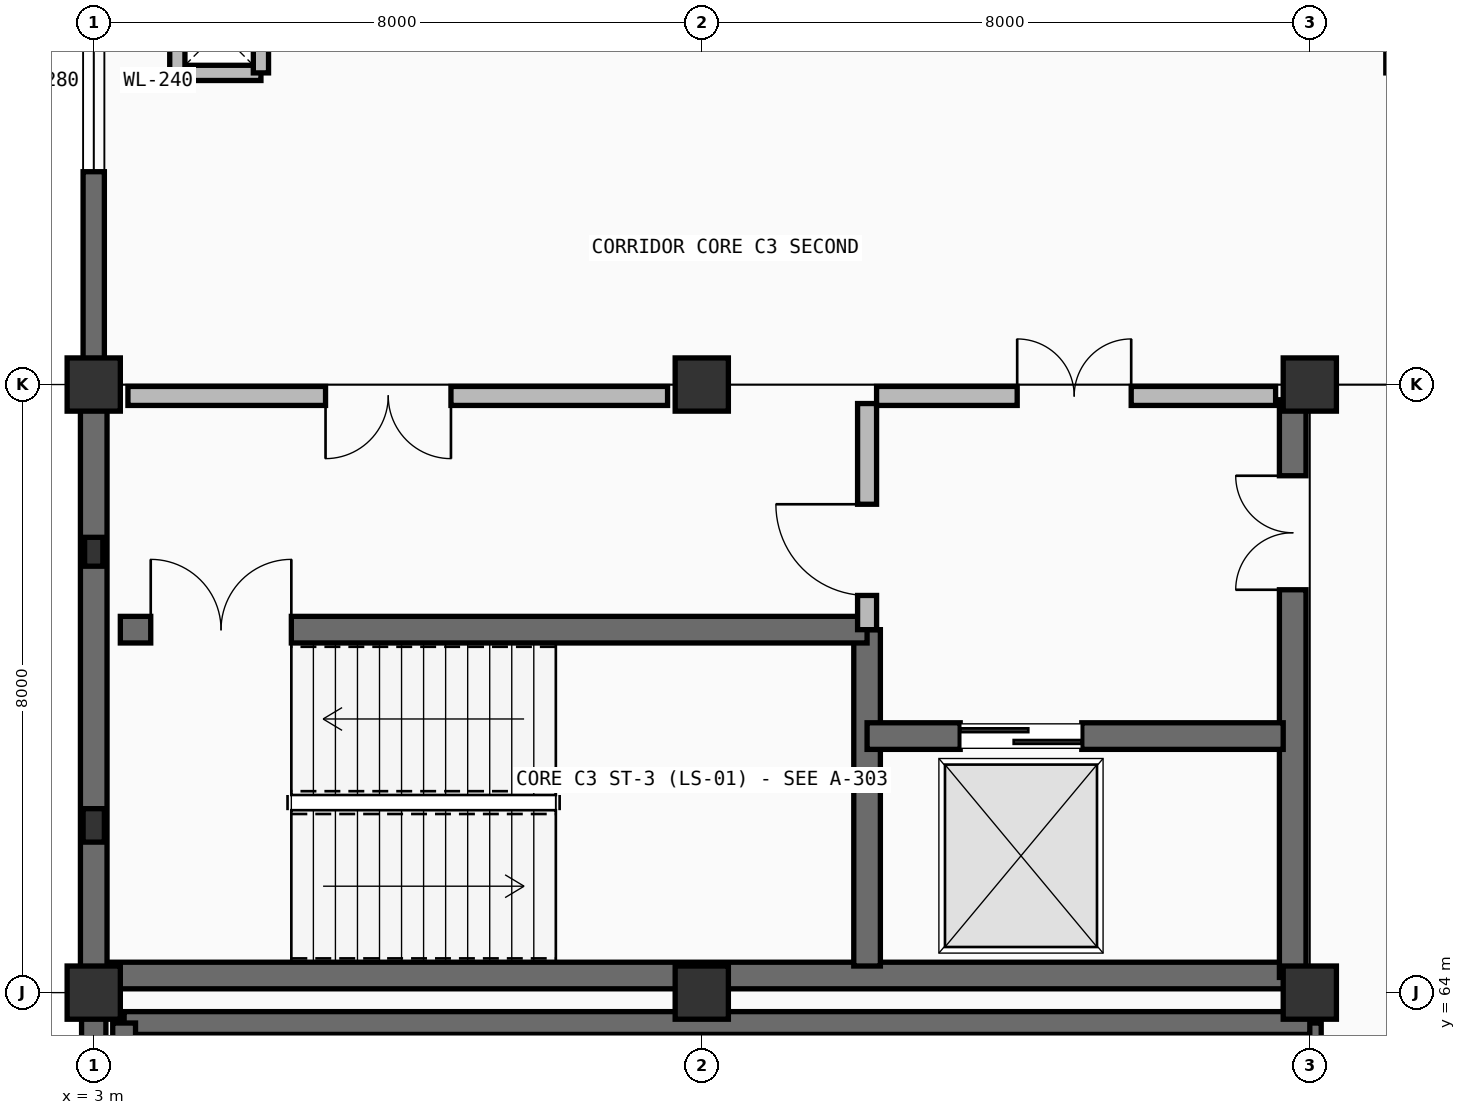
"""IFC4 building model, lengths in metres.
Left out: names, types, materials, properties, quantities, classifications, styles, units other than length and angle.
Written with IfcOpenShell. Run it as: python <this file> out.ifc"""

import sys

from ifc_helpers import new_model, si_unit, direction, frame, frame_2d, origin, origin_2d, place, context, subcontext, project, spatial, rectangle, extrude, element, fill, save


model = new_model("IFC4")
c1 = context("Model", 3, precision=1e-05, world=origin(), true_north=direction((0.0, 1.0)))
c2 = subcontext(c1, "Body", "Model", "MODEL_VIEW")
j1 = project(units=[si_unit("LENGTHUNIT", "METRE"), si_unit("PLANEANGLEUNIT", "RADIAN")], contexts=[c1])
p1 = place(None, origin())
s1 = spatial("IfcSite", under=j1, at=p1, CompositionType="ELEMENT")
p2 = place(p1, origin())
s2 = spatial("IfcBuilding", under=s1, at=p2, CompositionType="ELEMENT")
p3 = place(p2, frame((0.0, 0.0, 9.9)))
s3 = spatial("IfcBuildingStorey", under=s2, at=p3, CompositionType="ELEMENT", Elevation=9.9)
for number, where, z_axis, x_axis in (
    (1, (3.0, 64.0, 0.0), (0.0, 0.0, 1.0), (1.0, 0.0, 0.0)),
    (2, (3.0, 72.0, 0.0), (0.0, 0.0, 1.0), (1.0, 0.0, 0.0)),
    (3, (11.0, 64.0, 0.0), (0.0, 0.0, 1.0), (1.0, 0.0, 0.0)),
    (4, (11.0, 72.0, 0.0), (0.0, 0.0, 1.0), (1.0, 0.0, 0.0)),
    (5, (19.0, 64.0, 0.0), (0.0, 0.0, 1.0), (1.0, 0.0, 0.0)),
    (6, (19.0, 72.0, 0.0), (0.0, 0.0, 1.0), (1.0, 0.0, 0.0)),
):
    element("IfcColumn", number, at=place(p3, frame(where, z_axis=z_axis, x_axis=x_axis)), inside=s3, PredefinedType="COLUMN", context=c2, shape_type="SweptSolid", body=[
        extrude(rectangle(XDim=0.7, YDim=0.7, at=origin_2d()), origin(), (0.0, 0.0, 1.0), 4.5),
    ])
p4 = place(p3, frame((3.0, 66.2, 0.0), z_axis=(0.0, 0.0, 1.0), x_axis=(0.0, 1.0, 0.0)))
e7 = element("IfcColumn", 7, at=p4, inside=s3, PredefinedType="PILASTER", context=c2, shape_type="SweptSolid", body=[
    extrude(rectangle(XDim=0.44, YDim=0.28, at=origin_2d()), origin(), (0.0, 0.0, 1.0), 4.5),
])
p5 = place(p3, frame((3.0, 69.8, 0.0), z_axis=(0.0, 0.0, 1.0), x_axis=(0.0, 1.0, 0.0)))
e8 = element("IfcColumn", 8, at=p5, inside=s3, PredefinedType="PILASTER", context=c2, shape_type="SweptSolid", body=[
    extrude(rectangle(XDim=0.38, YDim=0.24, at=origin_2d()), origin(), (0.0, 0.0, 1.0), 4.5),
])
p6 = place(p3, frame((3.0, 59.0, 0.0), z_axis=(0.0, 0.0, 1.0), x_axis=(0.0, 1.0, 0.0)))
e9 = element("IfcWall", 9, at=p6, inside=s3, PredefinedType="SOLIDWALL", context=c2, shape_type="SweptSolid", body=[
    extrude(rectangle(XDim=5.0, YDim=0.32, at=frame_2d((2.5, 0.0))), origin(), (0.0, 0.0, 1.0), 4.5),
])
p7 = place(p3, frame((3.0, 64.0, 0.0), z_axis=(0.0, 0.0, 1.0), x_axis=(0.0, 1.0, 0.0)))
e10 = element("IfcWall", 10, at=p7, inside=s3, PredefinedType="SHEAR", context=c2, shape_type="SweptSolid", body=[
    extrude(rectangle(XDim=8.0, YDim=0.35, at=frame_2d((4.0, 0.0))), origin(), (0.0, 0.0, 1.0), 4.5),
])
p8 = place(p3, frame((3.0, 72.0, 0.0), z_axis=(0.0, 0.0, 1.0), x_axis=(0.0, 1.0, 0.0)))
e11 = element("IfcWall", 11, at=p8, inside=s3, PredefinedType="SOLIDWALL", context=c2, shape_type="SweptSolid", body=[
    extrude(rectangle(XDim=8.0, YDim=0.28, at=frame_2d((4.0, 0.0))), origin(), (0.0, 0.0, 1.0), 4.5),
])
p9 = place(p8, frame((2.8, 0.0, 1.1)))
e12 = element("IfcOpeningElement", 12, at=p9, cuts=e11, PredefinedType="OPENING", context=c2, shape_type="SweptSolid", body=[
    extrude(rectangle(XDim=2.4, YDim=1.1, at=frame_2d((1.2, 0.55))), frame((0.0, 0.15, 0.0), z_axis=(0.0, -1.0, 0.0), x_axis=(1.0, 0.0, 0.0)), (0.0, 0.0, 1.0), 0.3),
])
p10 = place(p3, frame((3.2, 64.225, 0.0), z_axis=(0.0, 0.0, 1.0), x_axis=(1.0, 0.0, 0.0)))
e13 = element("IfcWall", 13, at=p10, inside=s3, PredefinedType="SHEAR", context=c2, shape_type="SweptSolid", body=[
    extrude(rectangle(XDim=15.6, YDim=0.35, at=frame_2d((7.8, 0.0))), origin(), (0.0, 0.0, 1.0), 4.2),
])
p11 = place(p3, frame((13.175, 64.35, 0.0), z_axis=(0.0, 0.0, 1.0), x_axis=(0.0, 1.0, 0.0)))
e14 = element("IfcWall", 14, at=p11, inside=s3, PredefinedType="SHEAR", context=c2, shape_type="SweptSolid", body=[
    extrude(rectangle(XDim=4.425, YDim=0.35, at=frame_2d((2.212, 0.0))), origin(), (0.0, 0.0, 1.0), 4.2),
])
p12 = place(p3, frame((18.775, 64.2, 0.0), z_axis=(0.0, 0.0, 1.0), x_axis=(0.0, 1.0, 0.0)))
e15 = element("IfcWall", 15, at=p12, inside=s3, PredefinedType="SHEAR", context=c2, shape_type="SweptSolid", body=[
    extrude(rectangle(XDim=7.6, YDim=0.35, at=frame_2d((3.8, 0.0))), origin(), (0.0, 0.0, 1.0), 4.2),
])
p13 = place(p12, frame((5.1, 0.0, 0.0)))
e16 = element("IfcOpeningElement", 16, at=p13, cuts=e15, PredefinedType="OPENING", context=c2, shape_type="SweptSolid", body=[
    extrude(rectangle(XDim=1.5, YDim=2.2, at=frame_2d((0.75, 1.1))), frame((0.0, 0.185, 0.0), z_axis=(0.0, -1.0, 0.0), x_axis=(1.0, 0.0, 0.0)), (0.0, 0.0, 1.0), 0.37),
])
p14 = place(p3, frame((3.35, 68.775, 0.0), z_axis=(0.0, 0.0, 1.0), x_axis=(1.0, 0.0, 0.0)))
e17 = element("IfcWall", 17, at=p14, inside=s3, PredefinedType="SHEAR", context=c2, shape_type="SweptSolid", body=[
    extrude(rectangle(XDim=9.825, YDim=0.35, at=frame_2d((4.913, 0.0))), origin(), (0.0, 0.0, 1.0), 4.2),
])
p15 = place(p14, frame((0.4, 0.0, 0.0)))
e18 = element("IfcOpeningElement", 18, at=p15, cuts=e17, PredefinedType="OPENING", context=c2, shape_type="SweptSolid", body=[
    extrude(rectangle(XDim=1.85, YDim=2.25, at=frame_2d((0.925, 1.125))), frame((0.0, 0.185, 0.0), z_axis=(0.0, -1.0, 0.0), x_axis=(1.0, 0.0, 0.0)), (0.0, 0.0, 1.0), 0.37),
])
p16 = place(p3, frame((13.175, 67.375, 0.0), z_axis=(0.0, 0.0, 1.0), x_axis=(1.0, 0.0, 0.0)))
e19 = element("IfcWall", 19, at=p16, inside=s3, PredefinedType="SHEAR", context=c2, shape_type="SweptSolid", body=[
    extrude(rectangle(XDim=5.475, YDim=0.35, at=frame_2d((2.737, 0.0))), origin(), (0.0, 0.0, 1.0), 4.2),
])
p17 = place(p16, frame((1.225, 0.0, 0.0)))
e20 = element("IfcOpeningElement", 20, at=p17, cuts=e19, PredefinedType="OPENING", context=c2, shape_type="SweptSolid", body=[
    extrude(rectangle(XDim=1.6, YDim=2.4, at=frame_2d((0.8, 1.2))), frame((0.0, 0.185, 0.0), z_axis=(0.0, -1.0, 0.0), x_axis=(1.0, 0.0, 0.0)), (0.0, 0.0, 1.0), 0.37),
])
p18 = place(p3, frame((13.175, 68.775, 0.0), z_axis=(0.0, 0.0, 1.0), x_axis=(0.0, 1.0, 0.0)))
e21 = element("IfcWall", 21, at=p18, inside=s3, PredefinedType="PARTITIONING", context=c2, shape_type="SweptSolid", body=[
    extrude(rectangle(XDim=2.975, YDim=0.25, at=frame_2d((1.488, 0.0))), origin(), (0.0, 0.0, 1.0), 4.2),
])
p19 = place(p18, frame((0.45, 0.0, 0.0)))
e22 = element("IfcOpeningElement", 22, at=p19, cuts=e21, PredefinedType="OPENING", context=c2, shape_type="SweptSolid", body=[
    extrude(rectangle(XDim=1.2, YDim=2.2, at=frame_2d((0.6, 1.1))), frame((0.0, 0.135, 0.0), z_axis=(0.0, -1.0, 0.0), x_axis=(1.0, 0.0, 0.0)), (0.0, 0.0, 1.0), 0.27),
])
p20 = place(p3, frame((3.45, 71.85, 0.0), z_axis=(0.0, 0.0, 1.0), x_axis=(1.0, 0.0, 0.0)))
e23 = element("IfcWall", 23, at=p20, inside=s3, PredefinedType="PARTITIONING", context=c2, shape_type="SweptSolid", body=[
    extrude(rectangle(XDim=7.1, YDim=0.25, at=frame_2d((3.55, 0.0))), origin(), (0.0, 0.0, 1.0), 3.535),
])
p21 = place(p20, frame((2.6, 0.0, 0.0)))
e24 = element("IfcOpeningElement", 24, at=p21, cuts=e23, PredefinedType="OPENING", context=c2, shape_type="SweptSolid", body=[
    extrude(rectangle(XDim=1.65, YDim=2.25, at=frame_2d((0.825, 1.125))), frame((0.0, 0.135, 0.0), z_axis=(0.0, -1.0, 0.0), x_axis=(1.0, 0.0, 0.0)), (0.0, 0.0, 1.0), 0.27),
])
p22 = place(p3, frame((13.3, 71.85, 0.0), z_axis=(0.0, 0.0, 1.0), x_axis=(1.0, 0.0, 0.0)))
e25 = element("IfcWall", 25, at=p22, inside=s3, PredefinedType="PARTITIONING", context=c2, shape_type="SweptSolid", body=[
    extrude(rectangle(XDim=5.25, YDim=0.25, at=frame_2d((2.625, 0.0))), origin(), (0.0, 0.0, 1.0), 3.535),
])
p23 = place(p22, frame((1.85, 0.0, 0.0)))
e26 = element("IfcOpeningElement", 26, at=p23, cuts=e25, PredefinedType="OPENING", context=c2, shape_type="SweptSolid", body=[
    extrude(rectangle(XDim=1.5, YDim=2.2, at=frame_2d((0.75, 1.1))), frame((0.0, 0.135, 0.0), z_axis=(0.0, -1.0, 0.0), x_axis=(1.0, 0.0, 0.0)), (0.0, 0.0, 1.0), 0.27),
])
p24 = place(p3, frame((19.0, 38.6, 0.0), z_axis=(0.0, 0.0, 1.0), x_axis=(0.0, 1.0, 0.0)))
e27 = element("IfcWall", 27, at=p24, inside=s3, PredefinedType="SHEAR", context=c2, shape_type="SweptSolid", body=[
    extrude(rectangle(XDim=25.0, YDim=0.3, at=frame_2d((12.5, 0.0))), origin(), (0.0, 0.0, 1.0), 4.2),
])
p25 = place(p24, frame((15.609, 0.0, 0.0)))
e28 = element("IfcOpeningElement", 28, at=p25, cuts=e27, PredefinedType="OPENING", context=c2, shape_type="SweptSolid", body=[
    extrude(rectangle(XDim=1.4, YDim=2.22, at=frame_2d((0.7, 1.11))), frame((0.0, 0.16, 0.0), z_axis=(0.0, -1.0, 0.0), x_axis=(1.0, 0.0, 0.0)), (0.0, 0.0, 1.0), 0.32),
])
p26 = place(p3, frame((3.4, 63.6, 0.0), z_axis=(0.0, 0.0, 1.0), x_axis=(1.0, 0.0, 0.0)))
e29 = element("IfcWall", 29, at=p26, inside=s3, PredefinedType="SHEAR", context=c2, shape_type="SweptSolid", body=[
    extrude(rectangle(XDim=15.6, YDim=0.3, at=frame_2d((7.8, 0.0))), origin(), (0.0, 0.0, 1.0), 4.2),
])
p27 = place(p3, frame((3.4, 38.6, 0.0), z_axis=(0.0, 0.0, 1.0), x_axis=(0.0, 1.0, 0.0)))
e30 = element("IfcWall", 30, at=p27, inside=s3, PredefinedType="SHEAR", context=c2, shape_type="SweptSolid", body=[
    extrude(rectangle(XDim=25.0, YDim=0.3, at=frame_2d((12.5, 0.0))), origin(), (0.0, 0.0, 1.0), 4.2),
])
for number, where, z_axis, x_axis in (
    (31, (4.1, 76.1, 0.0), (0.0, 0.0, 1.0), (1.0, 0.0, 0.0)),
    (32, (4.1, 76.1, 0.0), (0.0, 0.0, 1.0), (0.0, 1.0, 0.0)),
    (33, (5.2, 76.1, 0.0), (0.0, 0.0, 1.0), (0.0, 1.0, 0.0)),
):
    element("IfcWall", number, at=place(p3, frame(where, z_axis=z_axis, x_axis=x_axis)), inside=s3, PredefinedType="PARTITIONING", context=c2, shape_type="SweptSolid", body=[
        extrude(rectangle(XDim=1.1, YDim=0.2, at=frame_2d((0.55, 0.0))), origin(), (0.0, 0.0, 1.0), 4.2),
    ])
p28 = place(p9, origin())
e34 = element("IfcWindow", 34, at=p28, inside=s3, PartitioningType="SINGLE_PANEL", PredefinedType="WINDOW", context=c2, shape_type="SweptSolid", body=[
    extrude(rectangle(XDim=2.4, YDim=1.1, at=frame_2d((1.2, 0.55))), frame((0.0, 0.03, 0.0), z_axis=(0.0, -1.0, 0.0), x_axis=(1.0, 0.0, 0.0)), (0.0, 0.0, 1.0), 0.06),
])
fill(e12, e34)
p29 = place(p15, origin())
e35 = element("IfcDoor", 35, at=p29, inside=s3, OperationType="DOUBLE_DOOR_SINGLE_SWING", PredefinedType="DOOR", context=c2, shape_type="SweptSolid", body=[
    extrude(rectangle(XDim=1.85, YDim=2.25, at=frame_2d((0.925, 1.125))), frame((0.0, 0.025, 0.0), z_axis=(0.0, -1.0, 0.0), x_axis=(1.0, 0.0, 0.0)), (0.0, 0.0, 1.0), 0.05),
])
fill(e18, e35)
p30 = place(p17, origin())
e36 = element("IfcDoor", 36, at=p30, inside=s3, OperationType="DOUBLE_DOOR_SLIDING", PredefinedType="DOOR", context=c2, shape_type="SweptSolid", body=[
    extrude(rectangle(XDim=1.6, YDim=2.4, at=frame_2d((0.8, 1.2))), frame((0.0, 0.025, 0.0), z_axis=(0.0, -1.0, 0.0), x_axis=(1.0, 0.0, 0.0)), (0.0, 0.0, 1.0), 0.05),
])
fill(e20, e36)
p31 = place(p19, origin())
e37 = element("IfcDoor", 37, at=p31, inside=s3, OperationType="SINGLE_SWING_RIGHT", PredefinedType="DOOR", context=c2, shape_type="SweptSolid", body=[
    extrude(rectangle(XDim=1.2, YDim=2.2, at=frame_2d((0.6, 1.1))), frame((0.0, 0.025, 0.0), z_axis=(0.0, -1.0, 0.0), x_axis=(1.0, 0.0, 0.0)), (0.0, 0.0, 1.0), 0.05),
])
fill(e22, e37)
p32 = place(p21, frame((1.65, 0.0, 0.0), z_axis=(0.0, 0.0, 1.0), x_axis=(-1.0, 0.0, 0.0)))
e38 = element("IfcDoor", 38, at=p32, inside=s3, OperationType="DOUBLE_DOOR_SINGLE_SWING", PredefinedType="DOOR", context=c2, shape_type="SweptSolid", body=[
    extrude(rectangle(XDim=1.65, YDim=2.25, at=frame_2d((0.825, 1.125))), frame((0.0, 0.025, 0.0), z_axis=(0.0, -1.0, 0.0), x_axis=(1.0, 0.0, 0.0)), (0.0, 0.0, 1.0), 0.05),
])
fill(e24, e38)
p33 = place(p23, origin())
e39 = element("IfcDoor", 39, at=p33, inside=s3, OperationType="DOUBLE_DOOR_SINGLE_SWING", PredefinedType="DOOR", context=c2, shape_type="SweptSolid", body=[
    extrude(rectangle(XDim=1.5, YDim=2.2, at=frame_2d((0.75, 1.1))), frame((0.0, 0.025, 0.0), z_axis=(0.0, -1.0, 0.0), x_axis=(1.0, 0.0, 0.0)), (0.0, 0.0, 1.0), 0.05),
])
fill(e26, e39)
p34 = place(p13, origin())
e40 = element("IfcDoor", 40, at=p34, inside=s3, OperationType="DOUBLE_DOOR_SINGLE_SWING", PredefinedType="DOOR", context=c2, shape_type="SweptSolid", body=[
    extrude(rectangle(XDim=1.5, YDim=2.2, at=frame_2d((0.75, 1.1))), frame((0.0, 0.025, 0.0), z_axis=(0.0, -1.0, 0.0), x_axis=(1.0, 0.0, 0.0)), (0.0, 0.0, 1.0), 0.05),
])
fill(e16, e40)
save(model, sys.argv[1])
